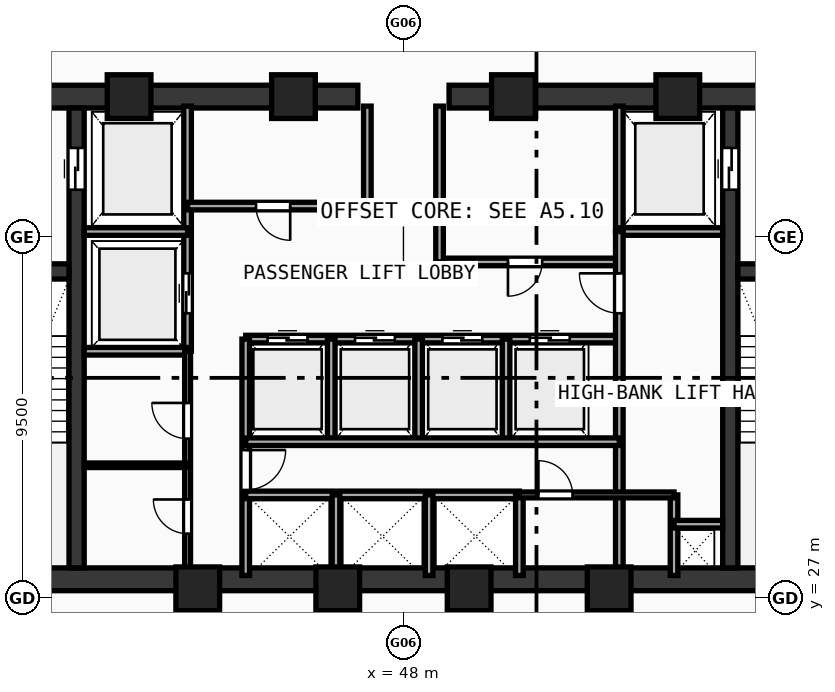
"""IFC4 building model, lengths in metres.
Left out: names, types, materials, properties, quantities, classifications, styles, units other than length and angle.
Written with IfcOpenShell. Run it as: python <this file> out.ifc"""

import sys

from ifc_helpers import new_model, si_unit, direction, frame, frame_2d, origin, origin_with_axes, origin_2d, place, context, subcontext, project, spatial, rectangle, hollow_rectangle, extrude, source, transform, mapped, element, fill, save


model = new_model("IFC4")
c1 = context("Model", 3, precision=1e-05, world=origin(), true_north=direction((0.0, 1.0)))
c2 = subcontext(c1, "Body", "Model", "MODEL_VIEW")
j1 = project(units=[si_unit("LENGTHUNIT", "METRE"), si_unit("PLANEANGLEUNIT", "RADIAN")], contexts=[c1])
p1 = place(None, origin())
s1 = spatial("IfcSite", under=j1, at=p1, CompositionType="ELEMENT")
p2 = place(p1, origin())
s2 = spatial("IfcBuilding", under=s1, at=p2, CompositionType="ELEMENT")
p3 = place(p2, frame((0.0, 0.0, 129.83)))
s3 = spatial("IfcBuildingStorey", under=s2, at=p3, CompositionType="ELEMENT", Elevation=129.83)
p4 = place(p3, frame((35.5, 27.5, 0.0), z_axis=(0.0, 0.0, 1.0), x_axis=(1.0, 0.0, 0.0)))
e1 = element("IfcWall", 1, at=p4, inside=s3, PredefinedType="SHEAR", context=c2, shape_type="SweptSolid", body=[
    extrude(rectangle(XDim=25.0, YDim=0.6, at=frame_2d((12.5, 0.0))), origin(), (0.0, 0.0, 1.0), 3.42),
])
p5 = place(p3, frame((35.5, 40.2, 0.0), z_axis=(0.0, 0.0, 1.0), x_axis=(1.0, 0.0, 0.0)))
e2 = element("IfcWall", 2, at=p5, inside=s3, PredefinedType="SHEAR", context=c2, shape_type="SweptSolid", body=[
    extrude(rectangle(XDim=11.3, YDim=0.6, at=frame_2d((5.65, 0.0))), origin(), (0.0, 0.0, 1.0), 3.42),
])
p6 = place(p5, frame((1.65, 0.0, 0.0)))
e3 = element("IfcOpeningElement", 3, at=p6, cuts=e2, PredefinedType="OPENING", context=c2, shape_type="SweptSolid", body=[
    extrude(rectangle(XDim=1.05, YDim=2.1, at=frame_2d((0.525, 1.05))), frame((0.0, 0.31, 0.0), z_axis=(0.0, -1.0, 0.0), x_axis=(1.0, 0.0, 0.0)), (0.0, 0.0, 1.0), 0.62),
])
p7 = place(p3, frame((49.2, 40.2, 0.0), z_axis=(0.0, 0.0, 1.0), x_axis=(1.0, 0.0, 0.0)))
e4 = element("IfcWall", 4, at=p7, inside=s3, PredefinedType="SHEAR", context=c2, shape_type="SweptSolid", body=[
    extrude(rectangle(XDim=11.3, YDim=0.6, at=frame_2d((5.65, 0.0))), origin(), (0.0, 0.0, 1.0), 3.42),
])
p8 = place(p7, frame((8.6, 0.0, 0.0)))
e5 = element("IfcOpeningElement", 5, at=p8, cuts=e4, PredefinedType="OPENING", context=c2, shape_type="SweptSolid", body=[
    extrude(rectangle(XDim=1.05, YDim=2.1, at=frame_2d((0.525, 1.05))), frame((0.0, 0.31, 0.0), z_axis=(0.0, -1.0, 0.0), x_axis=(1.0, 0.0, 0.0)), (0.0, 0.0, 1.0), 0.62),
])
p9 = place(p3, frame((39.4, 27.8, 0.0), z_axis=(0.0, 0.0, 1.0), x_axis=(0.0, 1.0, 0.0)))
e6 = element("IfcWall", 6, at=p9, inside=s3, PredefinedType="SHEAR", context=c2, shape_type="SweptSolid", body=[
    extrude(rectangle(XDim=12.1, YDim=0.4, at=frame_2d((6.05, 0.0))), origin(), (0.0, 0.0, 1.0), 3.42),
])
p10 = place(p9, frame((9.95, 0.0, 0.0)))
e7 = element("IfcOpeningElement", 7, at=p10, cuts=e6, PredefinedType="OPENING", context=c2, shape_type="SweptSolid", body=[
    extrude(rectangle(XDim=1.1, YDim=2.1, at=frame_2d((0.55, 1.05))), frame((0.0, 0.21, 0.0), z_axis=(0.0, -1.0, 0.0), x_axis=(1.0, 0.0, 0.0)), (0.0, 0.0, 1.0), 0.42),
])
p11 = place(p3, frame((56.6, 27.8, 0.0), z_axis=(0.0, 0.0, 1.0), x_axis=(0.0, 1.0, 0.0)))
e8 = element("IfcWall", 8, at=p11, inside=s3, PredefinedType="SHEAR", context=c2, shape_type="SweptSolid", body=[
    extrude(rectangle(XDim=12.1, YDim=0.4, at=frame_2d((6.05, 0.0))), origin(), (0.0, 0.0, 1.0), 3.42),
])
p12 = place(p11, frame((9.95, 0.0, 0.0)))
e9 = element("IfcOpeningElement", 9, at=p12, cuts=e8, PredefinedType="OPENING", context=c2, shape_type="SweptSolid", body=[
    extrude(rectangle(XDim=1.1, YDim=2.1, at=frame_2d((0.55, 1.05))), frame((0.0, 0.21, 0.0), z_axis=(0.0, -1.0, 0.0), x_axis=(1.0, 0.0, 0.0)), (0.0, 0.0, 1.0), 0.42),
])
p13 = place(p3, frame((36.1, 35.6, 0.0), z_axis=(0.0, 0.0, 1.0), x_axis=(1.0, 0.0, 0.0)))
e10 = element("IfcWall", 10, at=p13, inside=s3, PredefinedType="SHEAR", context=c2, shape_type="SweptSolid", body=[
    extrude(rectangle(XDim=3.1, YDim=0.4, at=frame_2d((1.55, 0.0))), origin(), (0.0, 0.0, 1.0), 3.42),
])
p14 = place(p13, frame((1.02, 0.0, 0.0)))
e11 = element("IfcOpeningElement", 11, at=p14, cuts=e10, PredefinedType="OPENING", context=c2, shape_type="SweptSolid", body=[
    extrude(rectangle(XDim=1.05, YDim=2.1, at=frame_2d((0.525, 1.05))), frame((0.0, 0.21, 0.0), z_axis=(0.0, -1.0, 0.0), x_axis=(1.0, 0.0, 0.0)), (0.0, 0.0, 1.0), 0.42),
])
p15 = place(p3, frame((56.8, 35.6, 0.0), z_axis=(0.0, 0.0, 1.0), x_axis=(1.0, 0.0, 0.0)))
e12 = element("IfcWall", 12, at=p15, inside=s3, PredefinedType="SHEAR", context=c2, shape_type="SweptSolid", body=[
    extrude(rectangle(XDim=3.1, YDim=0.4, at=frame_2d((1.55, 0.0))), origin(), (0.0, 0.0, 1.0), 3.42),
])
p16 = place(p15, frame((1.02, 0.0, 0.0)))
e13 = element("IfcOpeningElement", 13, at=p16, cuts=e12, PredefinedType="OPENING", context=c2, shape_type="SweptSolid", body=[
    extrude(rectangle(XDim=1.05, YDim=2.1, at=frame_2d((0.525, 1.05))), frame((0.0, 0.21, 0.0), z_axis=(0.0, -1.0, 0.0), x_axis=(1.0, 0.0, 0.0)), (0.0, 0.0, 1.0), 0.42),
])
m1 = source(origin(), c2, "Body", "SweptSolid", [
    extrude(hollow_rectangle(XDim=1.15, YDim=1.15, WallThickness=0.048, at=origin_2d()), origin(), (0.0, 0.0, 1.0), 3.68),
])
for number, where, z_axis, x_axis in (
    (14, (42.588, 27.25, -0.26), (0.0, 0.0, 1.0), (1.0, 0.0, 0.0)),
    (15, (46.272, 27.25, -0.26), (0.0, 0.0, 1.0), (1.0, 0.0, 0.0)),
    (16, (49.729, 27.25, -0.26), (0.0, 0.0, 1.0), (1.0, 0.0, 0.0)),
    (17, (53.412, 27.25, -0.26), (0.0, 0.0, 1.0), (1.0, 0.0, 0.0)),
    (18, (55.219, 40.2, -0.26), (0.0, 0.0, 1.0), (1.0, 0.0, 0.0)),
    (19, (50.894, 40.2, -0.26), (0.0, 0.0, 1.0), (1.0, 0.0, 0.0)),
    (20, (45.106, 40.2, -0.26), (0.0, 0.0, 1.0), (1.0, 0.0, 0.0)),
    (21, (40.781, 40.2, -0.26), (0.0, 0.0, 1.0), (1.0, 0.0, 0.0)),
):
    element("IfcColumn", number, at=place(p3, frame(where, z_axis=z_axis, x_axis=x_axis)), inside=s3, PredefinedType="COLUMN", context=c2, shape_type="MappedRepresentation", body=[
        mapped(m1, transform((0.0, 0.0, 0.0), scale=1.0)),
    ])
p17 = place(p3, frame((42.32, 33.5, 0.0), z_axis=(0.0, 0.0, 1.0), x_axis=(0.0, 1.0, 0.0)))
e22 = element("IfcWall", 22, at=p17, inside=s3, PredefinedType="SOLIDWALL", context=c2, shape_type="SweptSolid", body=[
    extrude(rectangle(XDim=6.45, YDim=0.2, at=frame_2d((3.225, 0.0))), origin(), (0.0, 0.0, 1.0), 3.42),
])
p18 = place(p17, frame((1.0, 0.0, 0.0)))
e23 = element("IfcOpeningElement", 23, at=p18, cuts=e22, PredefinedType="OPENING", context=c2, shape_type="SweptSolid", body=[
    extrude(rectangle(XDim=1.05, YDim=2.1, at=frame_2d((0.525, 1.05))), frame((0.0, 0.11, 0.0), z_axis=(0.0, -1.0, 0.0), x_axis=(1.0, 0.0, 0.0)), (0.0, 0.0, 1.0), 0.22),
])
for number, where, z_axis, x_axis in (
    (24, (39.6, 36.65, 0.0), (0.0, 0.0, 1.0), (1.0, 0.0, 0.0)),
    (25, (39.6, 33.5, 0.0), (0.0, 0.0, 1.0), (1.0, 0.0, 0.0)),
):
    element("IfcWall", number, at=place(p3, frame(where, z_axis=z_axis, x_axis=x_axis)), inside=s3, PredefinedType="SOLIDWALL", context=c2, shape_type="SweptSolid", body=[
        extrude(rectangle(XDim=2.72, YDim=0.2, at=frame_2d((1.36, 0.0))), origin(), (0.0, 0.0, 1.0), 3.42),
    ])
p19 = place(p3, frame((53.68, 36.65, 0.0), z_axis=(0.0, 0.0, 1.0), x_axis=(0.0, 1.0, 0.0)))
e26 = element("IfcWall", 26, at=p19, inside=s3, PredefinedType="SOLIDWALL", context=c2, shape_type="SweptSolid", body=[
    extrude(rectangle(XDim=3.3, YDim=0.2, at=frame_2d((1.65, 0.0))), origin(), (0.0, 0.0, 1.0), 3.42),
])
p20 = place(p3, frame((53.68, 36.65, 0.0), z_axis=(0.0, 0.0, 1.0), x_axis=(1.0, 0.0, 0.0)))
e27 = element("IfcWall", 27, at=p20, inside=s3, PredefinedType="SOLIDWALL", context=c2, shape_type="SweptSolid", body=[
    extrude(rectangle(XDim=2.72, YDim=0.2, at=frame_2d((1.36, 0.0))), origin(), (0.0, 0.0, 1.0), 3.42),
])
p21 = place(p3, frame((42.32, 37.32, 0.0), z_axis=(0.0, 0.0, 1.0), x_axis=(1.0, 0.0, 0.0)))
e28 = element("IfcWall", 28, at=p21, inside=s3, PredefinedType="SOLIDWALL", context=c2, shape_type="SweptSolid", body=[
    extrude(rectangle(XDim=4.73, YDim=0.2, at=frame_2d((2.365, 0.0))), origin(), (0.0, 0.0, 1.0), 3.42),
])
p22 = place(p21, frame((1.8, 0.0, 0.0)))
e29 = element("IfcOpeningElement", 29, at=p22, cuts=e28, PredefinedType="OPENING", context=c2, shape_type="SweptSolid", body=[
    extrude(rectangle(XDim=0.9, YDim=2.1, at=frame_2d((0.45, 1.05))), frame((0.0, 0.11, 0.0), z_axis=(0.0, -1.0, 0.0), x_axis=(1.0, 0.0, 0.0)), (0.0, 0.0, 1.0), 0.22),
])
p23 = place(p3, frame((48.95, 35.85, 0.0), z_axis=(0.0, 0.0, 1.0), x_axis=(1.0, 0.0, 0.0)))
e30 = element("IfcWall", 30, at=p23, inside=s3, PredefinedType="SOLIDWALL", context=c2, shape_type="SweptSolid", body=[
    extrude(rectangle(XDim=4.73, YDim=0.2, at=frame_2d((2.365, 0.0))), origin(), (0.0, 0.0, 1.0), 3.42),
])
p24 = place(p23, frame((1.8, 0.0, 0.0)))
e31 = element("IfcOpeningElement", 31, at=p24, cuts=e30, PredefinedType="OPENING", context=c2, shape_type="SweptSolid", body=[
    extrude(rectangle(XDim=0.9, YDim=2.1, at=frame_2d((0.45, 1.05))), frame((0.0, 0.11, 0.0), z_axis=(0.0, -1.0, 0.0), x_axis=(1.0, 0.0, 0.0)), (0.0, 0.0, 1.0), 0.22),
])
p25 = place(p3, frame((47.05, 37.32, 0.0), z_axis=(0.0, 0.0, 1.0), x_axis=(0.0, 1.0, 0.0)))
e32 = element("IfcWall", 32, at=p25, inside=s3, PredefinedType="SOLIDWALL", context=c2, shape_type="SweptSolid", body=[
    extrude(rectangle(XDim=2.63, YDim=0.2, at=frame_2d((1.315, 0.0))), origin(), (0.0, 0.0, 1.0), 3.42),
])
p26 = place(p3, frame((48.95, 35.85, 0.0), z_axis=(0.0, 0.0, 1.0), x_axis=(0.0, 1.0, 0.0)))
e33 = element("IfcWall", 33, at=p26, inside=s3, PredefinedType="SOLIDWALL", context=c2, shape_type="SweptSolid", body=[
    extrude(rectangle(XDim=4.1, YDim=0.2, at=frame_2d((2.05, 0.0))), origin(), (0.0, 0.0, 1.0), 3.42),
])
p27 = place(p3, frame((43.85, 33.82, 0.0), z_axis=(0.0, 0.0, 1.0), x_axis=(1.0, 0.0, 0.0)))
e34 = element("IfcWall", 34, at=p27, inside=s3, PredefinedType="SOLIDWALL", context=c2, shape_type="SweptSolid", body=[
    extrude(rectangle(XDim=9.83, YDim=0.2, at=frame_2d((4.915, 0.0))), origin(), (0.0, 0.0, 1.0), 3.42),
])
p28 = place(p27, frame((0.575, 0.0, 0.0)))
e35 = element("IfcOpeningElement", 35, at=p28, cuts=e34, PredefinedType="OPENING", context=c2, shape_type="SweptSolid", body=[
    extrude(rectangle(XDim=1.05, YDim=2.1, at=frame_2d((0.525, 1.05))), frame((0.0, 0.11, 0.0), z_axis=(0.0, -1.0, 0.0), x_axis=(1.0, 0.0, 0.0)), (0.0, 0.0, 1.0), 0.22),
])
p29 = place(p27, frame((2.875, 0.0, 0.0)))
e36 = element("IfcOpeningElement", 36, at=p29, cuts=e34, PredefinedType="OPENING", context=c2, shape_type="SweptSolid", body=[
    extrude(rectangle(XDim=1.05, YDim=2.1, at=frame_2d((0.525, 1.05))), frame((0.0, 0.11, 0.0), z_axis=(0.0, -1.0, 0.0), x_axis=(1.0, 0.0, 0.0)), (0.0, 0.0, 1.0), 0.22),
])
p30 = place(p27, frame((5.175, 0.0, 0.0)))
e37 = element("IfcOpeningElement", 37, at=p30, cuts=e34, PredefinedType="OPENING", context=c2, shape_type="SweptSolid", body=[
    extrude(rectangle(XDim=1.05, YDim=2.1, at=frame_2d((0.525, 1.05))), frame((0.0, 0.11, 0.0), z_axis=(0.0, -1.0, 0.0), x_axis=(1.0, 0.0, 0.0)), (0.0, 0.0, 1.0), 0.22),
])
p31 = place(p27, frame((7.475, 0.0, 0.0)))
e38 = element("IfcOpeningElement", 38, at=p31, cuts=e34, PredefinedType="OPENING", context=c2, shape_type="SweptSolid", body=[
    extrude(rectangle(XDim=1.05, YDim=2.1, at=frame_2d((0.525, 1.05))), frame((0.0, 0.11, 0.0), z_axis=(0.0, -1.0, 0.0), x_axis=(1.0, 0.0, 0.0)), (0.0, 0.0, 1.0), 0.22),
])
p32 = place(p3, frame((43.85, 27.6, 0.0), z_axis=(0.0, 0.0, 1.0), x_axis=(0.0, 1.0, 0.0)))
e39 = element("IfcWall", 39, at=p32, inside=s3, PredefinedType="SOLIDWALL", context=c2, shape_type="SweptSolid", body=[
    extrude(rectangle(XDim=6.22, YDim=0.2, at=frame_2d((3.11, 0.0))), origin(), (0.0, 0.0, 1.0), 3.42),
])
p33 = place(p32, frame((2.25, 0.0, 0.0)))
e40 = element("IfcOpeningElement", 40, at=p33, cuts=e39, PredefinedType="OPENING", context=c2, shape_type="SweptSolid", body=[
    extrude(rectangle(XDim=1.05, YDim=2.1, at=frame_2d((0.525, 1.05))), frame((0.0, 0.11, 0.0), z_axis=(0.0, -1.0, 0.0), x_axis=(1.0, 0.0, 0.0)), (0.0, 0.0, 1.0), 0.22),
])
p34 = place(p3, frame((53.68, 27.6, 0.0), z_axis=(0.0, 0.0, 1.0), x_axis=(0.0, 1.0, 0.0)))
e41 = element("IfcWall", 41, at=p34, inside=s3, PredefinedType="SOLIDWALL", context=c2, shape_type="SweptSolid", body=[
    extrude(rectangle(XDim=9.05, YDim=0.2, at=frame_2d((4.525, 0.0))), origin(), (0.0, 0.0, 1.0), 3.42),
])
p35 = place(p34, frame((6.9, 0.0, 0.0)))
e42 = element("IfcOpeningElement", 42, at=p35, cuts=e41, PredefinedType="OPENING", context=c2, shape_type="SweptSolid", body=[
    extrude(rectangle(XDim=1.05, YDim=2.1, at=frame_2d((0.525, 1.05))), frame((0.0, 0.11, 0.0), z_axis=(0.0, -1.0, 0.0), x_axis=(1.0, 0.0, 0.0)), (0.0, 0.0, 1.0), 0.22),
])
for number, where, z_axis, x_axis in (
    (43, (46.1, 31.12, 0.0), (0.0, 0.0, 1.0), (0.0, 1.0, 0.0)),
    (44, (48.4, 31.12, 0.0), (0.0, 0.0, 1.0), (0.0, 1.0, 0.0)),
    (45, (50.7, 31.12, 0.0), (0.0, 0.0, 1.0), (0.0, 1.0, 0.0)),
):
    element("IfcWall", number, at=place(p3, frame(where, z_axis=z_axis, x_axis=x_axis)), inside=s3, PredefinedType="SOLIDWALL", context=c2, shape_type="SweptSolid", body=[
        extrude(rectangle(XDim=2.7, YDim=0.2, at=frame_2d((1.35, 0.0))), origin(), (0.0, 0.0, 1.0), 3.42),
    ])
p36 = place(p3, frame((43.85, 29.72, 0.0), z_axis=(0.0, 0.0, 1.0), x_axis=(1.0, 0.0, 0.0)))
e46 = element("IfcWall", 46, at=p36, inside=s3, PredefinedType="SOLIDWALL", context=c2, shape_type="SweptSolid", body=[
    extrude(rectangle(XDim=7.2, YDim=0.2, at=frame_2d((3.6, 0.0))), origin(), (0.0, 0.0, 1.0), 3.42),
])
p37 = place(p3, frame((51.05, 27.6, 0.0), z_axis=(0.0, 0.0, 1.0), x_axis=(0.0, 1.0, 0.0)))
e47 = element("IfcWall", 47, at=p37, inside=s3, PredefinedType="SOLIDWALL", context=c2, shape_type="SweptSolid", body=[
    extrude(rectangle(XDim=2.12, YDim=0.2, at=frame_2d((1.06, 0.0))), origin(), (0.0, 0.0, 1.0), 3.42),
])
p38 = place(p3, frame((43.85, 31.12, 0.0), z_axis=(0.0, 0.0, 1.0), x_axis=(1.0, 0.0, 0.0)))
e48 = element("IfcWall", 48, at=p38, inside=s3, PredefinedType="SOLIDWALL", context=c2, shape_type="SweptSolid", body=[
    extrude(rectangle(XDim=9.83, YDim=0.2, at=frame_2d((4.915, 0.0))), origin(), (0.0, 0.0, 1.0), 3.42),
])
for number, where, z_axis, x_axis in (
    (49, (46.225, 27.6, 0.0), (0.0, 0.0, 1.0), (0.0, 1.0, 0.0)),
    (50, (48.675, 27.6, 0.0), (0.0, 0.0, 1.0), (0.0, 1.0, 0.0)),
    (51, (55.12, 27.6, 0.0), (0.0, 0.0, 1.0), (0.0, 1.0, 0.0)),
):
    element("IfcWall", number, at=place(p3, frame(where, z_axis=z_axis, x_axis=x_axis)), inside=s3, PredefinedType="SOLIDWALL", context=c2, shape_type="SweptSolid", body=[
        extrude(rectangle(XDim=2.12, YDim=0.2, at=frame_2d((1.06, 0.0))), origin(), (0.0, 0.0, 1.0), 3.42),
    ])
p39 = place(p3, frame((55.12, 28.95, 0.0), z_axis=(0.0, 0.0, 1.0), x_axis=(1.0, 0.0, 0.0)))
e52 = element("IfcWall", 52, at=p39, inside=s3, PredefinedType="SOLIDWALL", context=c2, shape_type="SweptSolid", body=[
    extrude(rectangle(XDim=1.28, YDim=0.2, at=frame_2d((0.64, 0.0))), origin(), (0.0, 0.0, 1.0), 3.42),
])
p40 = place(p3, frame((42.32, 27.6, 0.0), z_axis=(0.0, 0.0, 1.0), x_axis=(0.0, 1.0, 0.0)))
e53 = element("IfcWall", 53, at=p40, inside=s3, PredefinedType="PARTITIONING", context=c2, shape_type="SweptSolid", body=[
    extrude(rectangle(XDim=5.9, YDim=0.155, at=frame_2d((2.95, 0.0))), origin(), (0.0, 0.0, 1.0), 3.42),
])
p41 = place(p40, frame((1.1, 0.0, 0.0)))
e54 = element("IfcOpeningElement", 54, at=p41, cuts=e53, PredefinedType="OPENING", context=c2, shape_type="SweptSolid", body=[
    extrude(rectangle(XDim=0.9, YDim=2.1, at=frame_2d((0.45, 1.05))), frame((0.0, 0.087, 0.0), z_axis=(0.0, -1.0, 0.0), x_axis=(1.0, 0.0, 0.0)), (0.0, 0.0, 1.0), 0.175),
])
p42 = place(p40, frame((3.6, 0.0, 0.0)))
e55 = element("IfcOpeningElement", 55, at=p42, cuts=e53, PredefinedType="OPENING", context=c2, shape_type="SweptSolid", body=[
    extrude(rectangle(XDim=0.94, YDim=2.1, at=frame_2d((0.47, 1.05))), frame((0.0, 0.087, 0.0), z_axis=(0.0, -1.0, 0.0), x_axis=(1.0, 0.0, 0.0)), (0.0, 0.0, 1.0), 0.175),
])
p43 = place(p3, frame((51.05, 29.72, 0.0), z_axis=(0.0, 0.0, 1.0), x_axis=(1.0, 0.0, 0.0)))
e56 = element("IfcWall", 56, at=p43, inside=s3, PredefinedType="PARTITIONING", context=c2, shape_type="SweptSolid", body=[
    extrude(rectangle(XDim=4.07, YDim=0.155, at=frame_2d((2.035, 0.0))), origin(), (0.0, 0.0, 1.0), 3.42),
])
p44 = place(p43, frame((0.5, 0.0, 0.0)))
e57 = element("IfcOpeningElement", 57, at=p44, cuts=e56, PredefinedType="OPENING", context=c2, shape_type="SweptSolid", body=[
    extrude(rectangle(XDim=0.9, YDim=2.1, at=frame_2d((0.45, 1.05))), frame((0.0, 0.087, 0.0), z_axis=(0.0, -1.0, 0.0), x_axis=(1.0, 0.0, 0.0)), (0.0, 0.0, 1.0), 0.175),
])
p45 = place(p3, frame((39.6, 30.5, 0.0), z_axis=(0.0, 0.0, 1.0), x_axis=(1.0, 0.0, 0.0)))
e58 = element("IfcWall", 58, at=p45, inside=s3, PredefinedType="PARTITIONING", context=c2, shape_type="SweptSolid", body=[
    extrude(rectangle(XDim=2.72, YDim=0.12, at=frame_2d((1.36, 0.0))), origin(), (0.0, 0.0, 1.0), 3.42),
])
m2 = source(origin(), c2, "Body", "SweptSolid", [
    extrude(rectangle(XDim=1.1, YDim=2.1, at=frame_2d((0.55, 1.05))), frame((0.0, 0.025, 0.0), z_axis=(0.0, -1.0, 0.0), x_axis=(1.0, 0.0, 0.0)), (0.0, 0.0, 1.0), 0.05),
])
p46 = place(p10, frame((1.1, 0.0, 0.0), z_axis=(0.0, 0.0, 1.0), x_axis=(-1.0, 0.0, 0.0)))
e59 = element("IfcDoor", 59, at=p46, inside=s3, OperationType="DOUBLE_DOOR_SLIDING", PredefinedType="DOOR", context=c2, shape_type="MappedRepresentation", body=[
    mapped(m2, transform((0.0, 0.0, 0.0), scale=1.0)),
])
fill(e7, e59)
p47 = place(p12, origin_with_axes())
e60 = element("IfcDoor", 60, at=p47, inside=s3, OperationType="DOUBLE_DOOR_SLIDING", PredefinedType="DOOR", context=c2, shape_type="MappedRepresentation", body=[
    mapped(m2, transform((0.0, 0.0, 0.0), scale=1.0)),
])
fill(e9, e60)
m3 = source(origin(), c2, "Body", "SweptSolid", [
    extrude(rectangle(XDim=1.05, YDim=2.1, at=frame_2d((0.525, 1.05))), frame((0.0, 0.025, 0.0), z_axis=(0.0, -1.0, 0.0), x_axis=(1.0, 0.0, 0.0)), (0.0, 0.0, 1.0), 0.05),
])
p48 = place(p18, origin_with_axes())
e61 = element("IfcDoor", 61, at=p48, inside=s3, OperationType="DOUBLE_DOOR_SLIDING", PredefinedType="DOOR", context=c2, shape_type="MappedRepresentation", body=[
    mapped(m3, transform((0.0, 0.0, 0.0), scale=1.0)),
])
fill(e23, e61)
m4 = source(origin(), c2, "Body", "SweptSolid", [
    extrude(rectangle(XDim=0.9, YDim=2.1, at=frame_2d((0.45, 1.05))), frame((0.0, 0.025, 0.0), z_axis=(0.0, -1.0, 0.0), x_axis=(1.0, 0.0, 0.0)), (0.0, 0.0, 1.0), 0.05),
])
p49 = place(p22, frame((0.9, 0.0, 0.0), z_axis=(0.0, 0.0, 1.0), x_axis=(-1.0, 0.0, 0.0)))
e62 = element("IfcDoor", 62, at=p49, inside=s3, OperationType="SINGLE_SWING_LEFT", PredefinedType="DOOR", context=c2, shape_type="MappedRepresentation", body=[
    mapped(m4, transform((0.0, 0.0, 0.0), scale=1.0)),
])
fill(e29, e62)
p50 = place(p24, frame((0.9, 0.0, 0.0), z_axis=(0.0, 0.0, 1.0), x_axis=(-1.0, 0.0, 0.0)))
e63 = element("IfcDoor", 63, at=p50, inside=s3, OperationType="SINGLE_SWING_RIGHT", PredefinedType="DOOR", context=c2, shape_type="MappedRepresentation", body=[
    mapped(m4, transform((0.0, 0.0, 0.0), scale=1.0)),
])
fill(e31, e63)
p51 = place(p28, origin_with_axes())
e64 = element("IfcDoor", 64, at=p51, inside=s3, OperationType="DOUBLE_DOOR_SLIDING", PredefinedType="DOOR", context=c2, shape_type="MappedRepresentation", body=[
    mapped(m3, transform((0.0, 0.0, 0.0), scale=1.0)),
])
fill(e35, e64)
p52 = place(p29, origin_with_axes())
e65 = element("IfcDoor", 65, at=p52, inside=s3, OperationType="DOUBLE_DOOR_SLIDING", PredefinedType="DOOR", context=c2, shape_type="MappedRepresentation", body=[
    mapped(m3, transform((0.0, 0.0, 0.0), scale=1.0)),
])
fill(e36, e65)
p53 = place(p30, origin_with_axes())
e66 = element("IfcDoor", 66, at=p53, inside=s3, OperationType="DOUBLE_DOOR_SLIDING", PredefinedType="DOOR", context=c2, shape_type="MappedRepresentation", body=[
    mapped(m3, transform((0.0, 0.0, 0.0), scale=1.0)),
])
fill(e37, e66)
p54 = place(p31, origin_with_axes())
e67 = element("IfcDoor", 67, at=p54, inside=s3, OperationType="DOUBLE_DOOR_SLIDING", PredefinedType="DOOR", context=c2, shape_type="MappedRepresentation", body=[
    mapped(m3, transform((0.0, 0.0, 0.0), scale=1.0)),
])
fill(e38, e67)
p55 = place(p33, frame((1.05, 0.0, 0.0), z_axis=(0.0, 0.0, 1.0), x_axis=(-1.0, 0.0, 0.0)))
e68 = element("IfcDoor", 68, at=p55, inside=s3, OperationType="SINGLE_SWING_LEFT", PredefinedType="DOOR", context=c2, shape_type="MappedRepresentation", body=[
    mapped(m3, transform((0.0, 0.0, 0.0), scale=1.0)),
])
fill(e40, e68)
p56 = place(p35, origin_with_axes())
e69 = element("IfcDoor", 69, at=p56, inside=s3, OperationType="SINGLE_SWING_RIGHT", PredefinedType="DOOR", context=c2, shape_type="MappedRepresentation", body=[
    mapped(m3, transform((0.0, 0.0, 0.0), scale=1.0)),
])
fill(e42, e69)
p57 = place(p41, origin_with_axes())
e70 = element("IfcDoor", 70, at=p57, inside=s3, OperationType="SINGLE_SWING_RIGHT", PredefinedType="DOOR", context=c2, shape_type="MappedRepresentation", body=[
    mapped(m4, transform((0.0, 0.0, 0.0), scale=1.0)),
])
fill(e54, e70)
m5 = source(origin(), c2, "Body", "SweptSolid", [
    extrude(rectangle(XDim=0.94, YDim=2.1, at=frame_2d((0.47, 1.05))), frame((0.0, 0.025, 0.0), z_axis=(0.0, -1.0, 0.0), x_axis=(1.0, 0.0, 0.0)), (0.0, 0.0, 1.0), 0.05),
])
p58 = place(p42, origin_with_axes())
e71 = element("IfcDoor", 71, at=p58, inside=s3, OperationType="SINGLE_SWING_RIGHT", PredefinedType="DOOR", context=c2, shape_type="MappedRepresentation", body=[
    mapped(m5, transform((0.0, 0.0, 0.0), scale=1.0)),
])
fill(e55, e71)
p59 = place(p44, origin_with_axes())
e72 = element("IfcDoor", 72, at=p59, inside=s3, OperationType="SINGLE_SWING_LEFT", PredefinedType="DOOR", context=c2, shape_type="MappedRepresentation", body=[
    mapped(m4, transform((0.0, 0.0, 0.0), scale=1.0)),
])
fill(e57, e72)
save(model, sys.argv[1])
